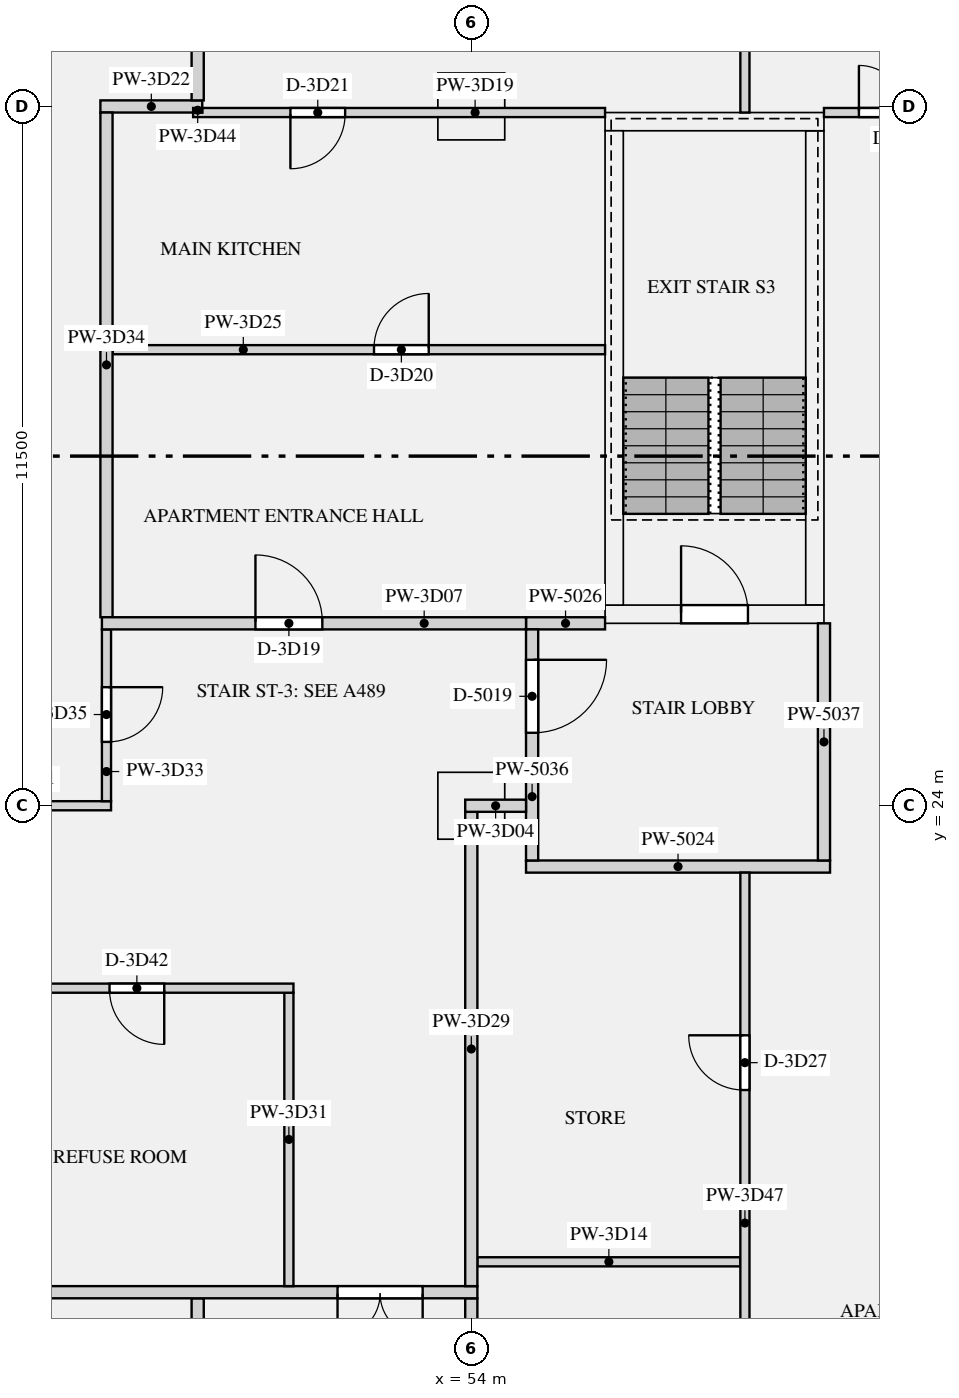
"""IFC4 building model, lengths in metres.
Left out: names, types, materials, properties, quantities, classifications, styles, units other than length and angle.
Written with IfcOpenShell. Run it as: python <this file> out.ifc"""

import sys

from ifc_helpers import new_model, si_unit, direction, frame, frame_2d, origin, origin_2d, place, context, subcontext, project, spatial, rectangle, extrude, element, fill, save


model = new_model("IFC4")
c1 = context("Model", 3, precision=1e-05, world=origin(), true_north=direction((0.0, 1.0)))
c2 = subcontext(c1, "Body", "Model", "MODEL_VIEW")
j1 = project(units=[si_unit("LENGTHUNIT", "METRE"), si_unit("PLANEANGLEUNIT", "RADIAN")], contexts=[c1])
p1 = place(None, origin())
s1 = spatial("IfcSite", under=j1, at=p1, CompositionType="ELEMENT")
p2 = place(p1, origin())
s2 = spatial("IfcBuilding", under=s1, at=p2, CompositionType="ELEMENT")
p3 = place(p2, frame((0.0, 0.0, 166.5)))
s3 = spatial("IfcBuildingStorey", under=s2, at=p3, CompositionType="ELEMENT", Elevation=166.5)
for number, where, z_axis, x_axis in (
    (1, (54.0, 24.0, 0.0), (0.0, 0.0, 1.0), (1.0, 0.0, 0.0)),
    (2, (54.0, 35.5, 0.0), (0.0, 0.0, 1.0), (1.0, 0.0, 0.0)),
):
    element("IfcColumn", number, at=place(p3, frame(where, z_axis=z_axis, x_axis=x_axis)), inside=s3, PredefinedType="COLUMN", context=c2, shape_type="SweptSolid", body=[
        extrude(rectangle(XDim=1.1, YDim=1.1, at=origin_2d()), origin(), (0.0, 0.0, 1.0), 3.15),
    ])
p4 = place(p3, frame((56.2, 27.15, 0.0), z_axis=(0.0, 0.0, 1.0), x_axis=(1.0, 0.0, 0.0)))
e3 = element("IfcWall", 3, at=p4, inside=s3, PredefinedType="SHEAR", context=c2, shape_type="SweptSolid", body=[
    extrude(rectangle(XDim=3.6, YDim=0.3, at=frame_2d((1.8, 0.0))), origin(), (0.0, 0.0, 1.0), 3.15),
])
p5 = place(p4, frame((1.25, 0.0, 0.0)))
e4 = element("IfcOpeningElement", 4, at=p5, cuts=e3, PredefinedType="OPENING", context=c2, shape_type="SweptSolid", body=[
    extrude(rectangle(XDim=1.1, YDim=2.1, at=frame_2d((0.55, 1.05))), frame((0.0, 0.16, 0.0), z_axis=(0.0, -1.0, 0.0), x_axis=(1.0, 0.0, 0.0)), (0.0, 0.0, 1.0), 0.32),
])
p6 = place(p3, frame((56.2, 35.25, 0.0), z_axis=(0.0, 0.0, 1.0), x_axis=(1.0, 0.0, 0.0)))
e5 = element("IfcWall", 5, at=p6, inside=s3, PredefinedType="SHEAR", context=c2, shape_type="SweptSolid", body=[
    extrude(rectangle(XDim=3.6, YDim=0.3, at=frame_2d((1.8, 0.0))), origin(), (0.0, 0.0, 1.0), 3.15),
])
for number, where, z_axis, x_axis in (
    (6, (56.35, 27.3, 0.0), (0.0, 0.0, 1.0), (0.0, 1.0, 0.0)),
    (7, (59.65, 27.3, 0.0), (0.0, 0.0, 1.0), (0.0, 1.0, 0.0)),
):
    element("IfcWall", number, at=place(p3, frame(where, z_axis=z_axis, x_axis=x_axis)), inside=s3, PredefinedType="SHEAR", context=c2, shape_type="SweptSolid", body=[
        extrude(rectangle(XDim=7.8, YDim=0.3, at=frame_2d((3.9, 0.0))), origin(), (0.0, 0.0, 1.0), 3.15),
    ])
p7 = place(p3, frame((54.9, 23.0, 0.0), z_axis=(0.0, 0.0, 1.0), x_axis=(1.0, 0.0, 0.0)))
e8 = element("IfcWall", 8, at=p7, inside=s3, PredefinedType="PARTITIONING", context=c2, shape_type="SweptSolid", body=[
    extrude(rectangle(XDim=5.0, YDim=0.2, at=frame_2d((2.5, 0.0))), origin(), (0.0, 0.0, 1.0), 2.83),
])
p8 = place(p3, frame((54.9, 27.0, 0.0), z_axis=(0.0, 0.0, 1.0), x_axis=(1.0, 0.0, 0.0)))
e9 = element("IfcWall", 9, at=p8, inside=s3, PredefinedType="PARTITIONING", context=c2, shape_type="SweptSolid", body=[
    extrude(rectangle(XDim=1.3, YDim=0.2, at=frame_2d((0.65, 0.0))), origin(), (0.0, 0.0, 1.0), 2.83),
])
p9 = place(p3, frame((49.5, 12.5, 0.0), z_axis=(0.0, 0.0, 1.0), x_axis=(0.0, 1.0, 0.0)))
e10 = element("IfcWall", 10, at=p9, inside=s3, PredefinedType="PARTITIONING", context=c2, shape_type="SweptSolid", body=[
    extrude(rectangle(XDim=3.4, YDim=0.2, at=frame_2d((1.7, 0.0))), origin(), (0.0, 0.0, 1.0), 2.83),
])
p10 = place(p9, frame((1.15, 0.0, 0.0)))
e11 = element("IfcOpeningElement", 11, at=p10, cuts=e10, PredefinedType="OPENING", context=c2, shape_type="SweptSolid", body=[
    extrude(rectangle(XDim=1.1, YDim=2.1, at=frame_2d((0.55, 1.05))), frame((0.0, 0.11, 0.0), z_axis=(0.0, -1.0, 0.0), x_axis=(1.0, 0.0, 0.0)), (0.0, 0.0, 1.0), 0.22),
])
p11 = place(p3, frame((54.0, 12.5, 0.0), z_axis=(0.0, 0.0, 1.0), x_axis=(0.0, 1.0, 0.0)))
e12 = element("IfcWall", 12, at=p11, inside=s3, PredefinedType="PARTITIONING", context=c2, shape_type="SweptSolid", body=[
    extrude(rectangle(XDim=3.4, YDim=0.2, at=frame_2d((1.7, 0.0))), origin(), (0.0, 0.0, 1.0), 2.83),
])
p12 = place(p3, frame((55.0, 23.1, 0.0), z_axis=(0.0, 0.0, 1.0), x_axis=(0.0, 1.0, 0.0)))
e13 = element("IfcWall", 13, at=p12, inside=s3, PredefinedType="PARTITIONING", context=c2, shape_type="SweptSolid", body=[
    extrude(rectangle(XDim=3.8, YDim=0.2, at=frame_2d((1.9, 0.0))), origin(), (0.0, 0.0, 1.0), 2.83),
])
p13 = place(p12, frame((2.1, 0.0, 0.0)))
e14 = element("IfcOpeningElement", 14, at=p13, cuts=e13, PredefinedType="OPENING", context=c2, shape_type="SweptSolid", body=[
    extrude(rectangle(XDim=1.2, YDim=2.1, at=frame_2d((0.6, 1.05))), frame((0.0, 0.11, 0.0), z_axis=(0.0, -1.0, 0.0), x_axis=(1.0, 0.0, 0.0)), (0.0, 0.0, 1.0), 0.22),
])
p14 = place(p3, frame((59.8, 23.1, 0.0), z_axis=(0.0, 0.0, 1.0), x_axis=(0.0, 1.0, 0.0)))
e15 = element("IfcWall", 15, at=p14, inside=s3, PredefinedType="PARTITIONING", context=c2, shape_type="SweptSolid", body=[
    extrude(rectangle(XDim=3.9, YDim=0.2, at=frame_2d((1.95, 0.0))), origin(), (0.0, 0.0, 1.0), 2.83),
])
p15 = place(p3, frame((45.0, 24.0, 0.0), z_axis=(0.0, 0.0, 1.0), x_axis=(1.0, 0.0, 0.0)))
e16 = element("IfcWall", 16, at=p15, inside=s3, PredefinedType="PARTITIONING", context=c2, shape_type="SweptSolid", body=[
    extrude(rectangle(XDim=3.075, YDim=0.15, at=frame_2d((1.538, 0.0))), origin(), (0.0, 0.0, 1.0), 2.83),
])
p16 = place(p3, frame((53.9, 24.0, 0.0), z_axis=(0.0, 0.0, 1.0), x_axis=(1.0, 0.0, 0.0)))
e17 = element("IfcWall", 17, at=p16, inside=s3, PredefinedType="PARTITIONING", context=c2, shape_type="SweptSolid", body=[
    extrude(rectangle(XDim=1.0, YDim=0.2, at=frame_2d((0.5, 0.0))), origin(), (0.0, 0.0, 1.0), 2.83),
])
p17 = place(p3, frame((20.925, 21.0, 0.0), z_axis=(0.0, 0.0, 1.0), x_axis=(1.0, 0.0, 0.0)))
e18 = element("IfcWall", 18, at=p17, inside=s3, PredefinedType="PARTITIONING", context=c2, shape_type="SweptSolid", body=[
    extrude(rectangle(XDim=30.15, YDim=0.15, at=frame_2d((15.075, 0.0))), origin(), (0.0, 0.0, 1.0), 2.83),
])
p18 = place(p17, frame((2.125, 0.0, 0.0)))
e19 = element("IfcOpeningElement", 19, at=p18, cuts=e18, PredefinedType="OPENING", context=c2, shape_type="SweptSolid", body=[
    extrude(rectangle(XDim=0.9, YDim=2.1, at=frame_2d((0.45, 1.05))), frame((0.0, 0.085, 0.0), z_axis=(0.0, -1.0, 0.0), x_axis=(1.0, 0.0, 0.0)), (0.0, 0.0, 1.0), 0.17),
])
p19 = place(p17, frame((7.125, 0.0, 0.0)))
e20 = element("IfcOpeningElement", 20, at=p19, cuts=e18, PredefinedType="OPENING", context=c2, shape_type="SweptSolid", body=[
    extrude(rectangle(XDim=0.9, YDim=2.1, at=frame_2d((0.45, 1.05))), frame((0.0, 0.085, 0.0), z_axis=(0.0, -1.0, 0.0), x_axis=(1.0, 0.0, 0.0)), (0.0, 0.0, 1.0), 0.17),
])
p20 = place(p17, frame((12.125, 0.0, 0.0)))
e21 = element("IfcOpeningElement", 21, at=p20, cuts=e18, PredefinedType="OPENING", context=c2, shape_type="SweptSolid", body=[
    extrude(rectangle(XDim=0.9, YDim=2.1, at=frame_2d((0.45, 1.05))), frame((0.0, 0.085, 0.0), z_axis=(0.0, -1.0, 0.0), x_axis=(1.0, 0.0, 0.0)), (0.0, 0.0, 1.0), 0.17),
])
p21 = place(p17, frame((17.125, 0.0, 0.0)))
e22 = element("IfcOpeningElement", 22, at=p21, cuts=e18, PredefinedType="OPENING", context=c2, shape_type="SweptSolid", body=[
    extrude(rectangle(XDim=0.9, YDim=2.1, at=frame_2d((0.45, 1.05))), frame((0.0, 0.085, 0.0), z_axis=(0.0, -1.0, 0.0), x_axis=(1.0, 0.0, 0.0)), (0.0, 0.0, 1.0), 0.17),
])
p22 = place(p17, frame((22.125, 0.0, 0.0)))
e23 = element("IfcOpeningElement", 23, at=p22, cuts=e18, PredefinedType="OPENING", context=c2, shape_type="SweptSolid", body=[
    extrude(rectangle(XDim=0.9, YDim=2.1, at=frame_2d((0.45, 1.05))), frame((0.0, 0.085, 0.0), z_axis=(0.0, -1.0, 0.0), x_axis=(1.0, 0.0, 0.0)), (0.0, 0.0, 1.0), 0.17),
])
p23 = place(p17, frame((27.125, 0.0, 0.0)))
e24 = element("IfcOpeningElement", 24, at=p23, cuts=e18, PredefinedType="OPENING", context=c2, shape_type="SweptSolid", body=[
    extrude(rectangle(XDim=0.9, YDim=2.1, at=frame_2d((0.45, 1.05))), frame((0.0, 0.085, 0.0), z_axis=(0.0, -1.0, 0.0), x_axis=(1.0, 0.0, 0.0)), (0.0, 0.0, 1.0), 0.17),
])
p24 = place(p3, frame((47.925, 27.0, 0.0), z_axis=(0.0, 0.0, 1.0), x_axis=(1.0, 0.0, 0.0)))
e25 = element("IfcWall", 25, at=p24, inside=s3, PredefinedType="PARTITIONING", context=c2, shape_type="SweptSolid", body=[
    extrude(rectangle(XDim=6.975, YDim=0.2, at=frame_2d((3.487, 0.0))), origin(), (0.0, 0.0, 1.0), 2.83),
])
p25 = place(p24, frame((2.525, 0.0, 0.0)))
e26 = element("IfcOpeningElement", 26, at=p25, cuts=e25, PredefinedType="OPENING", context=c2, shape_type="SweptSolid", body=[
    extrude(rectangle(XDim=1.1, YDim=2.1, at=frame_2d((0.55, 1.05))), frame((0.0, 0.11, 0.0), z_axis=(0.0, -1.0, 0.0), x_axis=(1.0, 0.0, 0.0)), (0.0, 0.0, 1.0), 0.22),
])
p26 = place(p3, frame((54.1, 16.5, 0.0), z_axis=(0.0, 0.0, 1.0), x_axis=(1.0, 0.0, 0.0)))
e27 = element("IfcWall", 27, at=p26, inside=s3, PredefinedType="PARTITIONING", context=c2, shape_type="SweptSolid", body=[
    extrude(rectangle(XDim=4.325, YDim=0.15, at=frame_2d((2.163, 0.0))), origin(), (0.0, 0.0, 1.0), 2.83),
])
p27 = place(p3, frame((49.425, 35.4, 0.0), z_axis=(0.0, 0.0, 1.0), x_axis=(1.0, 0.0, 0.0)))
e28 = element("IfcWall", 28, at=p27, inside=s3, PredefinedType="PARTITIONING", context=c2, shape_type="SweptSolid", body=[
    extrude(rectangle(XDim=6.775, YDim=0.15, at=frame_2d((3.387, 0.0))), origin(), (0.0, 0.0, 1.0), 2.83),
])
p28 = place(p27, frame((1.6, 0.0, 0.0)))
e29 = element("IfcOpeningElement", 29, at=p28, cuts=e28, PredefinedType="OPENING", context=c2, shape_type="SweptSolid", body=[
    extrude(rectangle(XDim=0.9, YDim=2.1, at=frame_2d((0.45, 1.05))), frame((0.0, 0.085, 0.0), z_axis=(0.0, -1.0, 0.0), x_axis=(1.0, 0.0, 0.0)), (0.0, 0.0, 1.0), 0.17),
])
p29 = place(p3, frame((59.8, 35.4, 0.0), z_axis=(0.0, 0.0, 1.0), x_axis=(1.0, 0.0, 0.0)))
e30 = element("IfcWall", 30, at=p29, inside=s3, PredefinedType="PARTITIONING", context=c2, shape_type="SweptSolid", body=[
    extrude(rectangle(XDim=11.5, YDim=0.15, at=frame_2d((5.75, 0.0))), origin(), (0.0, 0.0, 1.0), 2.83),
])
p30 = place(p29, frame((0.575, 0.0, 0.0)))
e31 = element("IfcOpeningElement", 31, at=p30, cuts=e30, PredefinedType="OPENING", context=c2, shape_type="SweptSolid", body=[
    extrude(rectangle(XDim=1.5, YDim=2.1, at=frame_2d((0.75, 1.05))), frame((0.0, 0.085, 0.0), z_axis=(0.0, -1.0, 0.0), x_axis=(1.0, 0.0, 0.0)), (0.0, 0.0, 1.0), 0.17),
])
p31 = place(p3, frame((47.9, 35.5, 0.0), z_axis=(0.0, 0.0, 1.0), x_axis=(1.0, 0.0, 0.0)))
e32 = element("IfcWall", 32, at=p31, inside=s3, PredefinedType="PARTITIONING", context=c2, shape_type="SweptSolid", body=[
    extrude(rectangle(XDim=1.675, YDim=0.2, at=frame_2d((0.837, 0.0))), origin(), (0.0, 0.0, 1.0), 2.83),
])
p32 = place(p3, frame((48.1, 31.5, 0.0), z_axis=(0.0, 0.0, 1.0), x_axis=(1.0, 0.0, 0.0)))
e33 = element("IfcWall", 33, at=p32, inside=s3, PredefinedType="PARTITIONING", context=c2, shape_type="SweptSolid", body=[
    extrude(rectangle(XDim=8.1, YDim=0.15, at=frame_2d((4.05, 0.0))), origin(), (0.0, 0.0, 1.0), 2.83),
])
p33 = place(p32, frame((4.3, 0.0, 0.0)))
e34 = element("IfcOpeningElement", 34, at=p33, cuts=e33, PredefinedType="OPENING", context=c2, shape_type="SweptSolid", body=[
    extrude(rectangle(XDim=0.9, YDim=2.1, at=frame_2d((0.45, 1.05))), frame((0.0, 0.085, 0.0), z_axis=(0.0, -1.0, 0.0), x_axis=(1.0, 0.0, 0.0)), (0.0, 0.0, 1.0), 0.17),
])
p34 = place(p3, frame((17.9, 16.0, 0.0), z_axis=(0.0, 0.0, 1.0), x_axis=(1.0, 0.0, 0.0)))
e35 = element("IfcWall", 35, at=p34, inside=s3, PredefinedType="PARTITIONING", context=c2, shape_type="SweptSolid", body=[
    extrude(rectangle(XDim=36.2, YDim=0.2, at=frame_2d((18.1, 0.0))), origin(), (0.0, 0.0, 1.0), 2.83),
])
p35 = place(p34, frame((0.9, 0.0, 0.0)))
e36 = element("IfcOpeningElement", 36, at=p35, cuts=e35, PredefinedType="OPENING", context=c2, shape_type="SweptSolid", body=[
    extrude(rectangle(XDim=1.4, YDim=2.1, at=frame_2d((0.7, 1.05))), frame((0.0, 0.11, 0.0), z_axis=(0.0, -1.0, 0.0), x_axis=(1.0, 0.0, 0.0)), (0.0, 0.0, 1.0), 0.22),
])
p36 = place(p34, frame((33.9, 0.0, 0.0)))
e37 = element("IfcOpeningElement", 37, at=p36, cuts=e35, PredefinedType="OPENING", context=c2, shape_type="SweptSolid", body=[
    extrude(rectangle(XDim=1.4, YDim=2.1, at=frame_2d((0.7, 1.05))), frame((0.0, 0.11, 0.0), z_axis=(0.0, -1.0, 0.0), x_axis=(1.0, 0.0, 0.0)), (0.0, 0.0, 1.0), 0.22),
])
p37 = place(p3, frame((54.0, 16.1, 0.0), z_axis=(0.0, 0.0, 1.0), x_axis=(0.0, 1.0, 0.0)))
e38 = element("IfcWall", 38, at=p37, inside=s3, PredefinedType="PARTITIONING", context=c2, shape_type="SweptSolid", body=[
    extrude(rectangle(XDim=7.8, YDim=0.2, at=frame_2d((3.9, 0.0))), origin(), (0.0, 0.0, 1.0), 2.83),
])
p38 = place(p3, frame((51.0, 16.1, 0.0), z_axis=(0.0, 0.0, 1.0), x_axis=(0.0, 1.0, 0.0)))
e39 = element("IfcWall", 39, at=p38, inside=s3, PredefinedType="PARTITIONING", context=c2, shape_type="SweptSolid", body=[
    extrude(rectangle(XDim=4.825, YDim=0.15, at=frame_2d((2.413, 0.0))), origin(), (0.0, 0.0, 1.0), 2.83),
])
p39 = place(p3, frame((48.0, 24.075, 0.0), z_axis=(0.0, 0.0, 1.0), x_axis=(0.0, 1.0, 0.0)))
e40 = element("IfcWall", 40, at=p39, inside=s3, PredefinedType="PARTITIONING", context=c2, shape_type="SweptSolid", body=[
    extrude(rectangle(XDim=2.825, YDim=0.15, at=frame_2d((1.413, 0.0))), origin(), (0.0, 0.0, 1.0), 2.83),
])
p40 = place(p39, frame((0.975, 0.0, 0.0)))
e41 = element("IfcOpeningElement", 41, at=p40, cuts=e40, PredefinedType="OPENING", context=c2, shape_type="SweptSolid", body=[
    extrude(rectangle(XDim=0.9, YDim=2.1, at=frame_2d((0.45, 1.05))), frame((0.0, 0.085, 0.0), z_axis=(0.0, -1.0, 0.0), x_axis=(1.0, 0.0, 0.0)), (0.0, 0.0, 1.0), 0.17),
])
p41 = place(p3, frame((48.0, 27.1, 0.0), z_axis=(0.0, 0.0, 1.0), x_axis=(0.0, 1.0, 0.0)))
e42 = element("IfcWall", 42, at=p41, inside=s3, PredefinedType="PARTITIONING", context=c2, shape_type="SweptSolid", body=[
    extrude(rectangle(XDim=8.3, YDim=0.2, at=frame_2d((4.15, 0.0))), origin(), (0.0, 0.0, 1.0), 2.83),
])
p42 = place(p3, frame((49.5, 35.4, 0.0), z_axis=(0.0, 0.0, 1.0), x_axis=(0.0, 1.0, 0.0)))
e43 = element("IfcWall", 43, at=p42, inside=s3, PredefinedType="PARTITIONING", context=c2, shape_type="SweptSolid", body=[
    extrude(rectangle(XDim=0.075, YDim=0.15, at=frame_2d((0.038, 0.0))), origin(), (0.0, 0.0, 1.0), 2.83),
])
p43 = place(p3, frame((49.5, 35.6, 0.0), z_axis=(0.0, 0.0, 1.0), x_axis=(0.0, 1.0, 0.0)))
e44 = element("IfcWall", 44, at=p43, inside=s3, PredefinedType="PARTITIONING", context=c2, shape_type="SweptSolid", body=[
    extrude(rectangle(XDim=7.2, YDim=0.2, at=frame_2d((3.6, 0.0))), origin(), (0.0, 0.0, 1.0), 2.83),
])
p44 = place(p3, frame((58.5, 12.575, 0.0), z_axis=(0.0, 0.0, 1.0), x_axis=(0.0, 1.0, 0.0)))
e45 = element("IfcWall", 45, at=p44, inside=s3, PredefinedType="PARTITIONING", context=c2, shape_type="SweptSolid", body=[
    extrude(rectangle(XDim=10.325, YDim=0.15, at=frame_2d((5.163, 0.0))), origin(), (0.0, 0.0, 1.0), 2.83),
])
p45 = place(p44, frame((6.75, 0.0, 0.0)))
e46 = element("IfcOpeningElement", 46, at=p45, cuts=e45, PredefinedType="OPENING", context=c2, shape_type="SweptSolid", body=[
    extrude(rectangle(XDim=0.9, YDim=2.1, at=frame_2d((0.45, 1.05))), frame((0.0, 0.085, 0.0), z_axis=(0.0, -1.0, 0.0), x_axis=(1.0, 0.0, 0.0)), (0.0, 0.0, 1.0), 0.17),
])
p46 = place(p44, frame((1.475, 0.0, 0.0)))
e47 = element("IfcOpeningElement", 47, at=p46, cuts=e45, PredefinedType="OPENING", context=c2, shape_type="SweptSolid", body=[
    extrude(rectangle(XDim=0.9, YDim=2.1, at=frame_2d((0.45, 1.05))), frame((0.0, 0.085, 0.0), z_axis=(0.0, -1.0, 0.0), x_axis=(1.0, 0.0, 0.0)), (0.0, 0.0, 1.0), 0.17),
])
p47 = place(p3, frame((58.5, 35.4, 0.0), z_axis=(0.0, 0.0, 1.0), x_axis=(0.0, 1.0, 0.0)))
e48 = element("IfcWall", 48, at=p47, inside=s3, PredefinedType="PARTITIONING", context=c2, shape_type="SweptSolid", body=[
    extrude(rectangle(XDim=7.4, YDim=0.15, at=frame_2d((3.7, 0.0))), origin(), (0.0, 0.0, 1.0), 2.83),
])
p48 = place(p47, frame((3.025, 0.0, 0.0)))
e49 = element("IfcOpeningElement", 49, at=p48, cuts=e48, PredefinedType="OPENING", context=c2, shape_type="SweptSolid", body=[
    extrude(rectangle(XDim=1.5, YDim=2.1, at=frame_2d((0.75, 1.05))), frame((0.0, 0.085, 0.0), z_axis=(0.0, -1.0, 0.0), x_axis=(1.0, 0.0, 0.0)), (0.0, 0.0, 1.0), 0.17),
])
p49 = place(p5, origin())
e50 = element("IfcDoor", 50, at=p49, inside=s3, OperationType="SINGLE_SWING_LEFT", PredefinedType="DOOR", context=c2, shape_type="SweptSolid", body=[
    extrude(rectangle(XDim=1.1, YDim=2.1, at=frame_2d((0.55, 1.05))), frame((0.0, 0.025, 0.0), z_axis=(0.0, -1.0, 0.0), x_axis=(1.0, 0.0, 0.0)), (0.0, 0.0, 1.0), 0.05),
])
fill(e4, e50)
p50 = place(p13, frame((1.2, 0.0, 0.0), z_axis=(0.0, 0.0, 1.0), x_axis=(-1.0, 0.0, 0.0)))
e51 = element("IfcDoor", 51, at=p50, inside=s3, OperationType="SINGLE_SWING_LEFT", PredefinedType="DOOR", context=c2, shape_type="SweptSolid", body=[
    extrude(rectangle(XDim=1.2, YDim=2.1, at=frame_2d((0.6, 1.05))), frame((0.0, 0.025, 0.0), z_axis=(0.0, -1.0, 0.0), x_axis=(1.0, 0.0, 0.0)), (0.0, 0.0, 1.0), 0.05),
])
fill(e14, e51)
p51 = place(p36, frame((1.4, 0.0, 0.0), z_axis=(0.0, 0.0, 1.0), x_axis=(-1.0, 0.0, 0.0)))
e52 = element("IfcDoor", 52, at=p51, inside=s3, OperationType="DOUBLE_DOOR_SINGLE_SWING", PredefinedType="DOOR", context=c2, shape_type="SweptSolid", body=[
    extrude(rectangle(XDim=1.4, YDim=2.1, at=frame_2d((0.7, 1.05))), frame((0.0, 0.025, 0.0), z_axis=(0.0, -1.0, 0.0), x_axis=(1.0, 0.0, 0.0)), (0.0, 0.0, 1.0), 0.05),
])
fill(e37, e52)
p52 = place(p25, origin())
e53 = element("IfcDoor", 53, at=p52, inside=s3, OperationType="SINGLE_SWING_LEFT", PredefinedType="DOOR", context=c2, shape_type="SweptSolid", body=[
    extrude(rectangle(XDim=1.1, YDim=2.1, at=frame_2d((0.55, 1.05))), frame((0.0, 0.025, 0.0), z_axis=(0.0, -1.0, 0.0), x_axis=(1.0, 0.0, 0.0)), (0.0, 0.0, 1.0), 0.05),
])
fill(e26, e53)
p53 = place(p33, origin())
e54 = element("IfcDoor", 54, at=p53, inside=s3, OperationType="SINGLE_SWING_RIGHT", PredefinedType="DOOR", context=c2, shape_type="SweptSolid", body=[
    extrude(rectangle(XDim=0.9, YDim=2.1, at=frame_2d((0.45, 1.05))), frame((0.0, 0.025, 0.0), z_axis=(0.0, -1.0, 0.0), x_axis=(1.0, 0.0, 0.0)), (0.0, 0.0, 1.0), 0.05),
])
fill(e34, e54)
p54 = place(p28, frame((0.9, 0.0, 0.0), z_axis=(0.0, 0.0, 1.0), x_axis=(-1.0, 0.0, 0.0)))
e55 = element("IfcDoor", 55, at=p54, inside=s3, OperationType="SINGLE_SWING_RIGHT", PredefinedType="DOOR", context=c2, shape_type="SweptSolid", body=[
    extrude(rectangle(XDim=0.9, YDim=2.1, at=frame_2d((0.45, 1.05))), frame((0.0, 0.025, 0.0), z_axis=(0.0, -1.0, 0.0), x_axis=(1.0, 0.0, 0.0)), (0.0, 0.0, 1.0), 0.05),
])
fill(e29, e55)
p55 = place(p30, origin())
e56 = element("IfcDoor", 56, at=p55, inside=s3, OperationType="DOUBLE_DOOR_SINGLE_SWING", PredefinedType="DOOR", context=c2, shape_type="SweptSolid", body=[
    extrude(rectangle(XDim=1.5, YDim=2.1, at=frame_2d((0.75, 1.05))), frame((0.0, 0.025, 0.0), z_axis=(0.0, -1.0, 0.0), x_axis=(1.0, 0.0, 0.0)), (0.0, 0.0, 1.0), 0.05),
])
fill(e31, e56)
p56 = place(p45, origin())
e57 = element("IfcDoor", 57, at=p56, inside=s3, OperationType="SINGLE_SWING_RIGHT", PredefinedType="DOOR", context=c2, shape_type="SweptSolid", body=[
    extrude(rectangle(XDim=0.9, YDim=2.1, at=frame_2d((0.45, 1.05))), frame((0.0, 0.025, 0.0), z_axis=(0.0, -1.0, 0.0), x_axis=(1.0, 0.0, 0.0)), (0.0, 0.0, 1.0), 0.05),
])
fill(e46, e57)
p57 = place(p40, frame((0.9, 0.0, 0.0), z_axis=(0.0, 0.0, 1.0), x_axis=(-1.0, 0.0, 0.0)))
e58 = element("IfcDoor", 58, at=p57, inside=s3, OperationType="SINGLE_SWING_LEFT", PredefinedType="DOOR", context=c2, shape_type="SweptSolid", body=[
    extrude(rectangle(XDim=0.9, YDim=2.1, at=frame_2d((0.45, 1.05))), frame((0.0, 0.025, 0.0), z_axis=(0.0, -1.0, 0.0), x_axis=(1.0, 0.0, 0.0)), (0.0, 0.0, 1.0), 0.05),
])
fill(e41, e58)
p58 = place(p23, frame((0.9, 0.0, 0.0), z_axis=(0.0, 0.0, 1.0), x_axis=(-1.0, 0.0, 0.0)))
e59 = element("IfcDoor", 59, at=p58, inside=s3, OperationType="SINGLE_SWING_LEFT", PredefinedType="DOOR", context=c2, shape_type="SweptSolid", body=[
    extrude(rectangle(XDim=0.9, YDim=2.1, at=frame_2d((0.45, 1.05))), frame((0.0, 0.025, 0.0), z_axis=(0.0, -1.0, 0.0), x_axis=(1.0, 0.0, 0.0)), (0.0, 0.0, 1.0), 0.05),
])
fill(e24, e59)
save(model, sys.argv[1])
